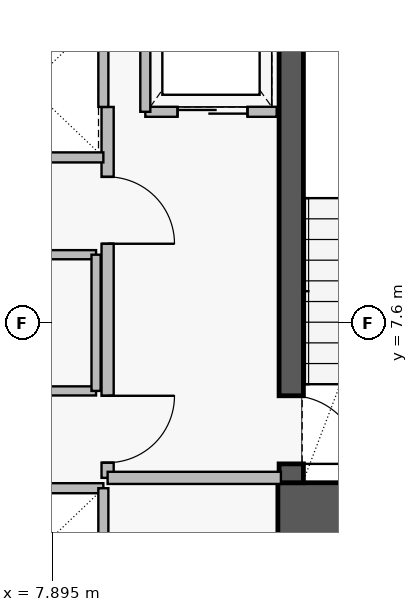
"""IFC4 building model, lengths in metres.
Left out: names, types, materials, properties, quantities, classifications, styles, units other than length and angle.
Written with IfcOpenShell. Run it as: python <this file> out.ifc"""

import sys

from ifc_helpers import new_model, si_unit, direction, frame, frame_2d, origin, place, context, subcontext, project, spatial, rectangle, extrude, element, fill, save


model = new_model("IFC4")
c1 = context("Model", 3, precision=1e-05, world=origin(), true_north=direction((0.0, 1.0)))
c2 = subcontext(c1, "Body", "Model", "MODEL_VIEW")
j1 = project(units=[si_unit("LENGTHUNIT", "METRE"), si_unit("PLANEANGLEUNIT", "RADIAN")], contexts=[c1])
p1 = place(None, origin())
s1 = spatial("IfcSite", under=j1, at=p1, CompositionType="ELEMENT")
p2 = place(p1, origin())
s2 = spatial("IfcBuilding", under=s1, at=p2, CompositionType="ELEMENT")
p3 = place(p2, frame((0.0, 0.0, 71.4)))
s3 = spatial("IfcBuildingStorey", under=s2, at=p3, CompositionType="ELEMENT", Elevation=71.4)
p4 = place(p3, frame((11.6, 4.52, 0.0), z_axis=(0.0, 0.0, 1.0), x_axis=(1.0, 0.0, 0.0)))
e1 = element("IfcWall", 1, at=p4, inside=s3, PredefinedType="SHEAR", context=c2, shape_type="SweptSolid", body=[
    extrude(rectangle(XDim=4.71, YDim=0.9, at=frame_2d((2.355, 0.0))), origin(), (0.0, 0.0, 1.0), 3.46),
])
p5 = place(p3, frame((11.82, 13.93, 0.0), z_axis=(0.0, 0.0, 1.0), x_axis=(0.0, -1.0, 0.0)))
e2 = element("IfcWall", 2, at=p5, inside=s3, PredefinedType="SHEAR", context=c2, shape_type="SweptSolid", body=[
    extrude(rectangle(XDim=8.96, YDim=0.4, at=frame_2d((4.48, 0.0))), origin(), (0.0, 0.0, 1.0), 3.46),
])
p6 = place(p5, frame((7.53, 0.0, 0.0)))
e3 = element("IfcOpeningElement", 3, at=p6, cuts=e2, PredefinedType="OPENING", context=c2, shape_type="SweptSolid", body=[
    extrude(rectangle(XDim=1.12, YDim=2.22, at=frame_2d((0.56, 1.11))), frame((0.0, 0.21, 0.0), z_axis=(0.0, -1.0, 0.0), x_axis=(1.0, 0.0, 0.0)), (0.0, 0.0, 1.0), 0.42),
])
p7 = place(p3, frame((8.8, 11.15, 0.0), z_axis=(0.0, 0.0, 1.0), x_axis=(0.0, -1.0, 0.0)))
e4 = element("IfcWall", 4, at=p7, inside=s3, PredefinedType="PARTITIONING", context=c2, shape_type="SweptSolid", body=[
    extrude(rectangle(XDim=6.1, YDim=0.2, at=frame_2d((3.05, 0.0))), origin(), (0.0, 0.0, 1.0), 3.43),
])
p8 = place(p7, frame((1.15, 0.0, 0.0)))
e5 = element("IfcOpeningElement", 5, at=p8, cuts=e4, PredefinedType="OPENING", context=c2, shape_type="SweptSolid", body=[
    extrude(rectangle(XDim=1.1, YDim=2.2, at=frame_2d((0.55, 1.1))), frame((0.0, 0.11, 0.0), z_axis=(0.0, -1.0, 0.0), x_axis=(1.0, 0.0, 0.0)), (0.0, 0.0, 1.0), 0.22),
])
p9 = place(p7, frame((4.75, 0.0, 0.0)))
e6 = element("IfcOpeningElement", 6, at=p9, cuts=e4, PredefinedType="OPENING", context=c2, shape_type="SweptSolid", body=[
    extrude(rectangle(XDim=1.1, YDim=2.2, at=frame_2d((0.55, 1.1))), frame((0.0, 0.11, 0.0), z_axis=(0.0, -1.0, 0.0), x_axis=(1.0, 0.0, 0.0)), (0.0, 0.0, 1.0), 0.22),
])
p10 = place(p3, frame((9.42, 11.07, 0.0), z_axis=(0.0, 0.0, 1.0), x_axis=(1.0, 0.0, 0.0)))
e7 = element("IfcWall", 7, at=p10, inside=s3, PredefinedType="PARTITIONING", context=c2, shape_type="SweptSolid", body=[
    extrude(rectangle(XDim=2.16, YDim=0.165, at=frame_2d((1.08, 0.0))), origin(), (0.0, 0.0, 1.0), 3.43),
])
p11 = place(p10, frame((0.53, 0.0, 0.0)))
e8 = element("IfcOpeningElement", 8, at=p11, cuts=e7, PredefinedType="OPENING", context=c2, shape_type="SweptSolid", body=[
    extrude(rectangle(XDim=1.15, YDim=2.25, at=frame_2d((0.575, 1.125))), frame((0.0, 0.093, 0.0), z_axis=(0.0, -1.0, 0.0), x_axis=(1.0, 0.0, 0.0)), (0.0, 0.0, 1.0), 0.185),
])
p12 = place(p3, frame((4.29, 6.48, 0.0), z_axis=(0.0, 0.0, 1.0), x_axis=(1.0, 0.0, 0.0)))
e9 = element("IfcWall", 9, at=p12, inside=s3, PredefinedType="PARTITIONING", context=c2, shape_type="SweptSolid", body=[
    extrude(rectangle(XDim=4.32, YDim=0.15, at=frame_2d((2.16, 0.0))), origin(), (0.0, 0.0, 1.0), 3.43),
])
p13 = place(p12, frame((1.71, 0.0, 0.0)))
e10 = element("IfcOpeningElement", 10, at=p13, cuts=e9, PredefinedType="OPENING", context=c2, shape_type="SweptSolid", body=[
    extrude(rectangle(XDim=0.9, YDim=2.15, at=frame_2d((0.45, 1.075))), frame((0.0, 0.085, 0.0), z_axis=(0.0, -1.0, 0.0), x_axis=(1.0, 0.0, 0.0)), (0.0, 0.0, 1.0), 0.17),
])
p14 = place(p3, frame((8.8, 5.05, 0.0), z_axis=(0.0, 0.0, 1.0), x_axis=(1.0, 0.0, 0.0)))
e11 = element("IfcWall", 11, at=p14, inside=s3, PredefinedType="PARTITIONING", context=c2, shape_type="SweptSolid", body=[
    extrude(rectangle(XDim=2.85, YDim=0.2, at=frame_2d((1.425, 0.0))), origin(), (0.0, 0.0, 1.0), 3.43),
])
p15 = place(p3, frame((9.42, 11.07, 0.0), z_axis=(0.0, 0.0, 1.0), x_axis=(0.0, 1.0, 0.0)))
e12 = element("IfcWall", 12, at=p15, inside=s3, PredefinedType="PARTITIONING", context=c2, shape_type="SweptSolid", body=[
    extrude(rectangle(XDim=2.96, YDim=0.165, at=frame_2d((1.48, 0.0))), origin(), (0.0, 0.0, 1.0), 3.43),
])
p16 = place(p3, frame((6.25, 4.88, 0.0), z_axis=(0.0, 0.0, 1.0), x_axis=(1.0, 0.0, 0.0)))
e13 = element("IfcWall", 13, at=p16, inside=s3, PredefinedType="PARTITIONING", context=c2, shape_type="SweptSolid", body=[
    extrude(rectangle(XDim=2.48, YDim=0.165, at=frame_2d((1.24, 0.0))), origin(), (0.0, 0.0, 1.0), 3.43),
])
p17 = place(p3, frame((8.73, 2.52, 0.0), z_axis=(0.0, 0.0, 1.0), x_axis=(0.0, 1.0, 0.0)))
e14 = element("IfcWall", 14, at=p17, inside=s3, PredefinedType="PARTITIONING", context=c2, shape_type="SweptSolid", body=[
    extrude(rectangle(XDim=2.36, YDim=0.165, at=frame_2d((1.18, 0.0))), origin(), (0.0, 0.0, 1.0), 3.43),
])
p18 = place(p3, frame((6.25, 10.32, 0.0), z_axis=(0.0, 0.0, 1.0), x_axis=(1.0, 0.0, 0.0)))
e15 = element("IfcWall", 15, at=p18, inside=s3, PredefinedType="PARTITIONING", context=c2, shape_type="SweptSolid", body=[
    extrude(rectangle(XDim=2.48, YDim=0.165, at=frame_2d((1.24, 0.0))), origin(), (0.0, 0.0, 1.0), 3.43),
])
p19 = place(p3, frame((8.73, 11.15, 0.0), z_axis=(0.0, 0.0, 1.0), x_axis=(0.0, 1.0, 0.0)))
e16 = element("IfcWall", 16, at=p19, inside=s3, PredefinedType="PARTITIONING", context=c2, shape_type="SweptSolid", body=[
    extrude(rectangle(XDim=1.53, YDim=0.165, at=frame_2d((0.765, 0.0))), origin(), (0.0, 0.0, 1.0), 3.43),
])
p20 = place(p3, frame((4.29, 8.72, 0.0), z_axis=(0.0, 0.0, 1.0), x_axis=(1.0, 0.0, 0.0)))
e17 = element("IfcWall", 17, at=p20, inside=s3, PredefinedType="PARTITIONING", context=c2, shape_type="SweptSolid", body=[
    extrude(rectangle(XDim=4.32, YDim=0.15, at=frame_2d((2.16, 0.0))), origin(), (0.0, 0.0, 1.0), 3.43),
])
p21 = place(p3, frame((8.61, 6.48, 0.0), z_axis=(0.0, 0.0, 1.0), x_axis=(0.0, 1.0, 0.0)))
e18 = element("IfcWall", 18, at=p21, inside=s3, PredefinedType="PARTITIONING", context=c2, shape_type="SweptSolid", body=[
    extrude(rectangle(XDim=2.24, YDim=0.15, at=frame_2d((1.12, 0.0))), origin(), (0.0, 0.0, 1.0), 3.43),
])
p22 = place(p6, origin())
e19 = element("IfcDoor", 19, at=p22, inside=s3, OperationType="SINGLE_SWING_RIGHT", PredefinedType="DOOR", context=c2, shape_type="SweptSolid", body=[
    extrude(rectangle(XDim=1.12, YDim=2.22, at=frame_2d((0.56, 1.11))), frame((0.0, 0.025, 0.0), z_axis=(0.0, -1.0, 0.0), x_axis=(1.0, 0.0, 0.0)), (0.0, 0.0, 1.0), 0.05),
])
fill(e3, e19)
p23 = place(p8, origin())
e20 = element("IfcDoor", 20, at=p23, inside=s3, OperationType="SINGLE_SWING_RIGHT", PredefinedType="DOOR", context=c2, shape_type="SweptSolid", body=[
    extrude(rectangle(XDim=1.1, YDim=2.2, at=frame_2d((0.55, 1.1))), frame((0.0, 0.025, 0.0), z_axis=(0.0, -1.0, 0.0), x_axis=(1.0, 0.0, 0.0)), (0.0, 0.0, 1.0), 0.05),
])
fill(e5, e20)
p24 = place(p9, origin())
e21 = element("IfcDoor", 21, at=p24, inside=s3, OperationType="SINGLE_SWING_LEFT", PredefinedType="DOOR", context=c2, shape_type="SweptSolid", body=[
    extrude(rectangle(XDim=1.1, YDim=2.2, at=frame_2d((0.55, 1.1))), frame((0.0, 0.025, 0.0), z_axis=(0.0, -1.0, 0.0), x_axis=(1.0, 0.0, 0.0)), (0.0, 0.0, 1.0), 0.05),
])
fill(e6, e21)
p25 = place(p11, origin())
e22 = element("IfcDoor", 22, at=p25, inside=s3, OperationType="SLIDING_TO_LEFT", PredefinedType="DOOR", context=c2, shape_type="SweptSolid", body=[
    extrude(rectangle(XDim=1.15, YDim=2.25, at=frame_2d((0.575, 1.125))), frame((0.0, 0.025, 0.0), z_axis=(0.0, -1.0, 0.0), x_axis=(1.0, 0.0, 0.0)), (0.0, 0.0, 1.0), 0.05),
])
fill(e8, e22)
save(model, sys.argv[1])
